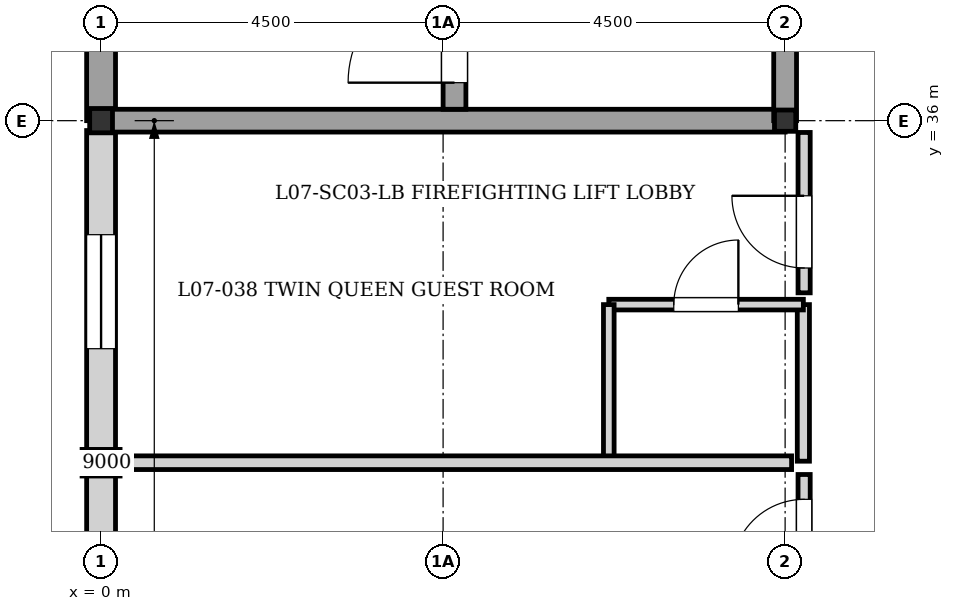
"""IFC4 building model, lengths in metres.
Left out: names, types, materials, properties, quantities, classifications, styles, units other than length and angle.
Written with IfcOpenShell. Run it as: python <this file> out.ifc"""

import sys

from ifc_helpers import new_model, si_unit, direction, frame, frame_2d, origin, origin_2d, place, context, subcontext, project, spatial, rectangle, i_section, extrude, element, fill, save


model = new_model("IFC4")
c1 = context("Model", 3, precision=1e-05, world=origin(), true_north=direction((0.0, 1.0)))
c2 = subcontext(c1, "Body", "Model", "MODEL_VIEW")
j1 = project(units=[si_unit("LENGTHUNIT", "METRE"), si_unit("PLANEANGLEUNIT", "RADIAN")], contexts=[c1])
p1 = place(None, origin())
s1 = spatial("IfcSite", under=j1, at=p1, CompositionType="ELEMENT")
p2 = place(p1, origin())
s2 = spatial("IfcBuilding", under=s1, at=p2, CompositionType="ELEMENT")
p3 = place(p2, frame((0.0, 0.0, 23.68)))
s3 = spatial("IfcBuildingStorey", under=s2, at=p3, CompositionType="ELEMENT", Elevation=23.68)
p4 = place(p3, frame((0.0, 36.0, 0.0), z_axis=(0.0, 0.0, 1.0), x_axis=(1.0, 0.0, 0.0)))
e1 = element("IfcColumn", 1, at=p4, inside=s3, PredefinedType="COLUMN", context=c2, shape_type="SweptSolid", body=[
    extrude(i_section(OverallWidth=0.3, OverallDepth=0.32, WebThickness=0.011, FlangeThickness=0.021, at=origin_2d()), origin(), (0.0, 0.0, 1.0), 3.2),
])
p5 = place(p3, frame((9.0, 36.0, 0.0), z_axis=(0.0, 0.0, 1.0), x_axis=(1.0, 0.0, 0.0)))
e2 = element("IfcColumn", 2, at=p5, inside=s3, PredefinedType="COLUMN", context=c2, shape_type="SweptSolid", body=[
    extrude(i_section(OverallWidth=0.28, OverallDepth=0.28, WebThickness=0.01, FlangeThickness=0.018, at=origin_2d()), origin(), (0.0, 0.0, 1.0), 3.2),
])
p6 = place(p3, frame((0.0, 31.5, 0.0), z_axis=(0.0, 0.0, 1.0), x_axis=(0.0, 1.0, 0.0)))
e3 = element("IfcColumn", 3, at=p6, inside=s3, PredefinedType="PILASTER", context=c2, shape_type="SweptSolid", body=[
    extrude(rectangle(XDim=0.35, YDim=0.5, at=origin_2d()), origin(), (0.0, 0.0, 1.0), 3.2),
])
p7 = place(p3, frame((0.0, 27.0, 0.0), z_axis=(0.0, 0.0, 1.0), x_axis=(0.0, 1.0, 0.0)))
e4 = element("IfcWall", 4, at=p7, inside=s3, PredefinedType="SOLIDWALL", context=c2, shape_type="SweptSolid", body=[
    extrude(rectangle(XDim=8.87, YDim=0.38, at=frame_2d((4.435, 0.0))), origin(), (0.0, 0.0, 1.0), 2.66),
])
p8 = place(p7, frame((1.5, 0.0, 0.35)))
e5 = element("IfcOpeningElement", 5, at=p8, cuts=e4, PredefinedType="OPENING", context=c2, shape_type="SweptSolid", body=[
    extrude(rectangle(XDim=1.5, YDim=1.8, at=frame_2d((0.75, 0.9))), frame((0.0, 0.2, 0.0), z_axis=(0.0, -1.0, 0.0), x_axis=(1.0, 0.0, 0.0)), (0.0, 0.0, 1.0), 0.4),
])
p9 = place(p7, frame((6.0, 0.0, 0.35)))
e6 = element("IfcOpeningElement", 6, at=p9, cuts=e4, PredefinedType="OPENING", context=c2, shape_type="SweptSolid", body=[
    extrude(rectangle(XDim=1.5, YDim=1.8, at=frame_2d((0.75, 0.9))), frame((0.0, 0.2, 0.0), z_axis=(0.0, -1.0, 0.0), x_axis=(1.0, 0.0, 0.0)), (0.0, 0.0, 1.0), 0.4),
])
p10 = place(p3, frame((0.0, 36.0, 0.0), z_axis=(0.0, 0.0, 1.0), x_axis=(0.0, 1.0, 0.0)))
e7 = element("IfcWall", 7, at=p10, inside=s3, PredefinedType="SOLIDWALL", context=c2, shape_type="SweptSolid", body=[
    extrude(rectangle(XDim=9.0, YDim=0.38, at=frame_2d((4.5, 0.0))), origin(), (0.0, 0.0, 1.0), 2.96),
])
p11 = place(p3, frame((0.0, 36.0, 0.0), z_axis=(0.0, 0.0, 1.0), x_axis=(1.0, 0.0, 0.0)))
e8 = element("IfcWall", 8, at=p11, inside=s3, PredefinedType="SHEAR", context=c2, shape_type="SweptSolid", body=[
    extrude(rectangle(XDim=9.0, YDim=0.3, at=frame_2d((4.5, 0.0))), origin(), (0.0, 0.0, 1.0), 2.96),
])
p12 = place(p3, frame((9.0, 36.0, 0.0), z_axis=(0.0, 0.0, 1.0), x_axis=(0.0, 1.0, 0.0)))
e9 = element("IfcWall", 9, at=p12, inside=s3, PredefinedType="SHEAR", context=c2, shape_type="SweptSolid", body=[
    extrude(rectangle(XDim=9.0, YDim=0.3, at=frame_2d((4.5, 0.0))), origin(), (0.0, 0.0, 1.0), 2.96),
])
p13 = place(p12, frame((1.95, 0.0, 0.0)))
e10 = element("IfcOpeningElement", 10, at=p13, cuts=e9, PredefinedType="OPENING", context=c2, shape_type="SweptSolid", body=[
    extrude(rectangle(XDim=1.6, YDim=2.1, at=frame_2d((0.8, 1.05))), frame((0.0, 0.16, 0.0), z_axis=(0.0, -1.0, 0.0), x_axis=(1.0, 0.0, 0.0)), (0.0, 0.0, 1.0), 0.32),
])
p14 = place(p3, frame((4.65, 36.15, 0.0), z_axis=(0.0, 0.0, 1.0), x_axis=(0.0, 1.0, 0.0)))
e11 = element("IfcWall", 11, at=p14, inside=s3, PredefinedType="SHEAR", context=c2, shape_type="SweptSolid", body=[
    extrude(rectangle(XDim=8.7, YDim=0.3, at=frame_2d((4.35, 0.0))), origin(), (0.0, 0.0, 1.0), 2.96),
])
p15 = place(p14, frame((0.35, 0.0, 0.0)))
e12 = element("IfcOpeningElement", 12, at=p15, cuts=e11, PredefinedType="OPENING", context=c2, shape_type="SweptSolid", body=[
    extrude(rectangle(XDim=1.4, YDim=2.02, at=frame_2d((0.7, 1.01))), frame((0.0, 0.16, 0.0), z_axis=(0.0, -1.0, 0.0), x_axis=(1.0, 0.0, 0.0)), (0.0, 0.0, 1.0), 0.32),
])
p16 = place(p3, frame((9.24, 31.52, 0.0), z_axis=(0.0, 0.0, 1.0), x_axis=(0.0, 1.0, 0.0)))
e13 = element("IfcWall", 13, at=p16, inside=s3, PredefinedType="PARTITIONING", context=c2, shape_type="SweptSolid", body=[
    extrude(rectangle(XDim=2.06, YDim=0.16, at=frame_2d((1.03, 0.0))), origin(), (0.0, 0.0, 1.0), 2.96),
])
p17 = place(p3, frame((6.68, 33.58, 0.0), z_axis=(0.0, 0.0, 1.0), x_axis=(1.0, 0.0, 0.0)))
e14 = element("IfcWall", 14, at=p17, inside=s3, PredefinedType="PLUMBINGWALL", context=c2, shape_type="SweptSolid", body=[
    extrude(rectangle(XDim=2.56, YDim=0.14, at=frame_2d((1.28, 0.0))), origin(), (0.0, 0.0, 1.0), 2.96),
])
p18 = place(p17, frame((0.855, 0.0, 0.0)))
e15 = element("IfcOpeningElement", 15, at=p18, cuts=e14, PredefinedType="OPENING", context=c2, shape_type="SweptSolid", body=[
    extrude(rectangle(XDim=0.85, YDim=2.04, at=frame_2d((0.425, 1.02))), frame((0.0, 0.08, 0.0), z_axis=(0.0, -1.0, 0.0), x_axis=(1.0, 0.0, 0.0)), (0.0, 0.0, 1.0), 0.16),
])
p19 = place(p3, frame((6.68, 31.52, 0.0), z_axis=(0.0, 0.0, 1.0), x_axis=(0.0, 1.0, 0.0)))
e16 = element("IfcWall", 16, at=p19, inside=s3, PredefinedType="PLUMBINGWALL", context=c2, shape_type="SweptSolid", body=[
    extrude(rectangle(XDim=2.06, YDim=0.14, at=frame_2d((1.03, 0.0))), origin(), (0.0, 0.0, 1.0), 2.96),
])
p20 = place(p3, frame((0.195, 31.5, 0.0), z_axis=(0.0, 0.0, 1.0), x_axis=(1.0, 0.0, 0.0)))
e17 = element("IfcWall", 17, at=p20, inside=s3, PredefinedType="PARTITIONING", context=c2, shape_type="SweptSolid", body=[
    extrude(rectangle(XDim=8.89, YDim=0.18, at=frame_2d((4.445, 0.0))), origin(), (0.0, 0.0, 1.0), 2.96),
])
p21 = place(p3, frame((9.25, 29.235, 0.0), z_axis=(0.0, 0.0, 1.0), x_axis=(0.0, 1.0, 0.0)))
e18 = element("IfcWall", 18, at=p21, inside=s3, PredefinedType="PARTITIONING", context=c2, shape_type="SweptSolid", body=[
    extrude(rectangle(XDim=2.11, YDim=0.16, at=frame_2d((1.055, 0.0))), origin(), (0.0, 0.0, 1.0), 2.96),
])
p22 = place(p21, frame((0.833, 0.0, 0.0)))
e19 = element("IfcOpeningElement", 19, at=p22, cuts=e18, PredefinedType="OPENING", context=c2, shape_type="SweptSolid", body=[
    extrude(rectangle(XDim=0.95, YDim=2.15, at=frame_2d((0.475, 1.075))), frame((0.0, 0.09, 0.0), z_axis=(0.0, -1.0, 0.0), x_axis=(1.0, 0.0, 0.0)), (0.0, 0.0, 1.0), 0.18),
])
p23 = place(p3, frame((9.25, 33.735, 0.0), z_axis=(0.0, 0.0, 1.0), x_axis=(0.0, 1.0, 0.0)))
e20 = element("IfcWall", 20, at=p23, inside=s3, PredefinedType="PARTITIONING", context=c2, shape_type="SweptSolid", body=[
    extrude(rectangle(XDim=2.11, YDim=0.16, at=frame_2d((1.055, 0.0))), origin(), (0.0, 0.0, 1.0), 2.96),
])
p24 = place(p23, frame((0.327, 0.0, 0.0)))
e21 = element("IfcOpeningElement", 21, at=p24, cuts=e20, PredefinedType="OPENING", context=c2, shape_type="SweptSolid", body=[
    extrude(rectangle(XDim=0.95, YDim=2.15, at=frame_2d((0.475, 1.075))), frame((0.0, 0.09, 0.0), z_axis=(0.0, -1.0, 0.0), x_axis=(1.0, 0.0, 0.0)), (0.0, 0.0, 1.0), 0.18),
])
p25 = place(p9, origin())
e22 = element("IfcWindow", 22, at=p25, inside=s3, PartitioningType="SINGLE_PANEL", PredefinedType="WINDOW", context=c2, shape_type="SweptSolid", body=[
    extrude(rectangle(XDim=1.5, YDim=1.8, at=frame_2d((0.75, 0.9))), frame((0.0, 0.03, 0.0), z_axis=(0.0, -1.0, 0.0), x_axis=(1.0, 0.0, 0.0)), (0.0, 0.0, 1.0), 0.06),
])
fill(e6, e22)
p26 = place(p15, origin())
e23 = element("IfcDoor", 23, at=p26, inside=s3, OperationType="SINGLE_SWING_LEFT", PredefinedType="DOOR", context=c2, shape_type="SweptSolid", body=[
    extrude(rectangle(XDim=1.4, YDim=2.02, at=frame_2d((0.7, 1.01))), frame((0.0, 0.025, 0.0), z_axis=(0.0, -1.0, 0.0), x_axis=(1.0, 0.0, 0.0)), (0.0, 0.0, 1.0), 0.05),
])
fill(e12, e23)
p27 = place(p18, origin())
e24 = element("IfcDoor", 24, at=p27, inside=s3, OperationType="SINGLE_SWING_RIGHT", PredefinedType="DOOR", context=c2, shape_type="SweptSolid", body=[
    extrude(rectangle(XDim=0.85, YDim=2.04, at=frame_2d((0.425, 1.02))), frame((0.0, 0.025, 0.0), z_axis=(0.0, -1.0, 0.0), x_axis=(1.0, 0.0, 0.0)), (0.0, 0.0, 1.0), 0.05),
])
fill(e15, e24)
p28 = place(p22, origin())
e25 = element("IfcDoor", 25, at=p28, inside=s3, OperationType="SINGLE_SWING_LEFT", PredefinedType="DOOR", context=c2, shape_type="SweptSolid", body=[
    extrude(rectangle(XDim=0.95, YDim=2.15, at=frame_2d((0.475, 1.075))), frame((0.0, 0.025, 0.0), z_axis=(0.0, -1.0, 0.0), x_axis=(1.0, 0.0, 0.0)), (0.0, 0.0, 1.0), 0.05),
])
fill(e19, e25)
p29 = place(p24, origin())
e26 = element("IfcDoor", 26, at=p29, inside=s3, OperationType="SINGLE_SWING_RIGHT", PredefinedType="DOOR", context=c2, shape_type="SweptSolid", body=[
    extrude(rectangle(XDim=0.95, YDim=2.15, at=frame_2d((0.475, 1.075))), frame((0.0, 0.025, 0.0), z_axis=(0.0, -1.0, 0.0), x_axis=(1.0, 0.0, 0.0)), (0.0, 0.0, 1.0), 0.05),
])
fill(e21, e26)
save(model, sys.argv[1])
